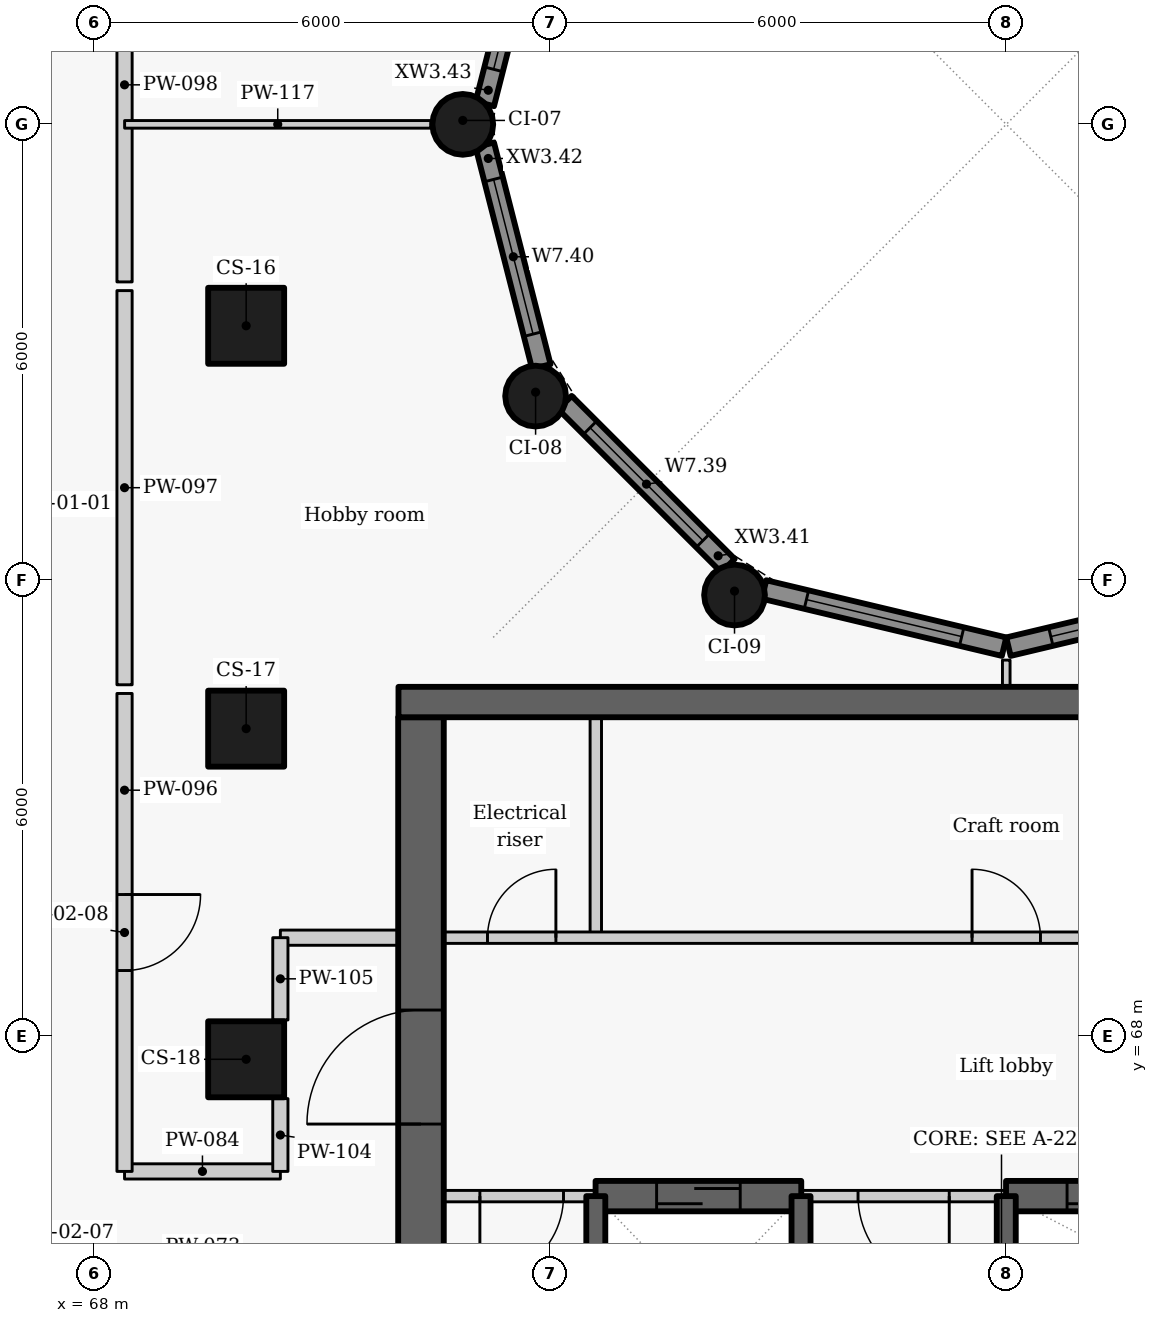
"""IFC4 building model, lengths in metres.
Left out: names, types, materials, properties, quantities, classifications, styles, units other than length and angle.
Written with IfcOpenShell. Run it as: python <this file> out.ifc"""

import sys

from ifc_helpers import new_model, si_unit, direction, frame, frame_2d, origin, origin_2d, place, context, subcontext, project, spatial, rectangle, circle, extrude, element, fill, save


model = new_model("IFC4")
c1 = context("Model", 3, precision=1e-05, world=origin(), true_north=direction((0.0, 1.0)))
c2 = subcontext(c1, "Body", "Model", "MODEL_VIEW")
j1 = project(units=[si_unit("LENGTHUNIT", "METRE"), si_unit("PLANEANGLEUNIT", "RADIAN")], contexts=[c1])
p1 = place(None, origin())
s1 = spatial("IfcSite", under=j1, at=p1, CompositionType="ELEMENT")
p2 = place(p1, origin())
s2 = spatial("IfcBuilding", under=s1, at=p2, CompositionType="ELEMENT")
p3 = place(p2, frame((0.0, 0.0, 130.5)))
s3 = spatial("IfcBuildingStorey", under=s2, at=p3, CompositionType="ELEMENT", Elevation=130.5)
for number, where, z_axis, x_axis in (
    (1, (70.0, 77.35, 0.0), (0.0, 0.0, 1.0), (0.0, -1.0, 0.0)),
    (2, (70.0, 72.05, 0.0), (0.0, 0.0, 1.0), (0.0, -1.0, 0.0)),
    (3, (70.0, 67.7, 0.0), (0.0, 0.0, 1.0), (0.0, -1.0, 0.0)),
):
    element("IfcColumn", number, at=place(p3, frame(where, z_axis=z_axis, x_axis=x_axis)), inside=s3, PredefinedType="COLUMN", context=c2, shape_type="SweptSolid", body=[
        extrude(rectangle(XDim=1.0, YDim=1.0, at=origin_2d()), origin(), (0.0, 0.0, 1.0), 3.3),
    ])
for number, where, z_axis, x_axis in (
    (4, (72.85, 80.0, 0.0), (0.0, 0.0, 1.0), (0.0, -1.0, 0.0)),
    (5, (73.808, 76.425, 0.0), (0.0, 0.0, 1.0), (0.5, -0.866, 0.0)),
    (6, (76.425, 73.808, 0.0), (0.0, 0.0, 1.0), (0.866, -0.5, 0.0)),
):
    element("IfcColumn", number, at=place(p3, frame(where, z_axis=z_axis, x_axis=x_axis)), inside=s3, PredefinedType="COLUMN", context=c2, shape_type="SweptSolid", body=[
        extrude(circle(Radius=0.4, at=origin_2d()), origin(), (0.0, 0.0, 1.0), 3.3),
    ])
p4 = place(p3, frame((83.186, 73.881, 0.0), z_axis=(0.0, 0.0, 1.0), x_axis=(-0.972773113459, -0.231759508395, 0.0)))
e7 = element("IfcWall", 7, at=p4, inside=s3, PredefinedType="SOLIDWALL", context=c2, shape_type="SweptSolid", body=[
    extrude(rectangle(XDim=3.246, YDim=0.25, at=frame_2d((1.623, 0.0))), origin(), (0.0, 0.0, 1.0), 2.425),
])
p5 = place(p4, frame((0.573, 0.0, 0.9)))
e8 = element("IfcOpeningElement", 8, at=p5, cuts=e7, PredefinedType="OPENING", context=c2, shape_type="SweptSolid", body=[
    extrude(rectangle(XDim=2.1, YDim=1.1, at=frame_2d((1.05, 0.55))), frame((0.0, 0.135, 0.0), z_axis=(0.0, -1.0, 0.0), x_axis=(1.0, 0.0, 0.0)), (0.0, 0.0, 1.0), 0.27),
])
p6 = place(p3, frame((79.971, 73.128, 0.0), z_axis=(0.0, 0.0, 1.0), x_axis=(-0.972773113459, 0.231759508395, 0.0)))
e9 = element("IfcWall", 9, at=p6, inside=s3, PredefinedType="SOLIDWALL", context=c2, shape_type="SweptSolid", body=[
    extrude(rectangle(XDim=3.246, YDim=0.25, at=frame_2d((1.623, 0.0))), origin(), (0.0, 0.0, 1.0), 2.425),
])
p7 = place(p6, frame((0.573, 0.0, 0.9)))
e10 = element("IfcOpeningElement", 10, at=p7, cuts=e9, PredefinedType="OPENING", context=c2, shape_type="SweptSolid", body=[
    extrude(rectangle(XDim=2.1, YDim=1.1, at=frame_2d((1.05, 0.55))), frame((0.0, 0.135, 0.0), z_axis=(0.0, -1.0, 0.0), x_axis=(1.0, 0.0, 0.0)), (0.0, 0.0, 1.0), 0.27),
])
p8 = place(p3, frame((76.339, 74.194, 0.0), z_axis=(0.0, 0.0, 1.0), x_axis=(-0.707106781187, 0.707106781187, 0.0)))
e11 = element("IfcWall", 11, at=p8, inside=s3, PredefinedType="SOLIDWALL", context=c2, shape_type="SweptSolid", body=[
    extrude(rectangle(XDim=3.033, YDim=0.25, at=frame_2d((1.517, 0.0))), origin(), (0.0, 0.0, 1.0), 2.425),
])
p9 = place(p8, frame((0.467, 0.0, 0.9)))
e12 = element("IfcOpeningElement", 12, at=p9, cuts=e11, PredefinedType="OPENING", context=c2, shape_type="SweptSolid", body=[
    extrude(rectangle(XDim=2.1, YDim=1.1, at=frame_2d((1.05, 0.55))), frame((0.0, 0.135, 0.0), z_axis=(0.0, -1.0, 0.0), x_axis=(1.0, 0.0, 0.0)), (0.0, 0.0, 1.0), 0.27),
])
p10 = place(p3, frame((73.883, 76.813, 0.0), z_axis=(0.0, 0.0, 1.0), x_axis=(-0.247055971283, 0.969001211069, 0.0)))
e13 = element("IfcWall", 13, at=p10, inside=s3, PredefinedType="SOLIDWALL", context=c2, shape_type="SweptSolid", body=[
    extrude(rectangle(XDim=3.01, YDim=0.25, at=frame_2d((1.505, 0.0))), origin(), (0.0, 0.0, 1.0), 2.425),
])
p11 = place(p10, frame((0.441, 0.0, 0.9)))
e14 = element("IfcOpeningElement", 14, at=p11, cuts=e13, PredefinedType="OPENING", context=c2, shape_type="SweptSolid", body=[
    extrude(rectangle(XDim=2.1, YDim=1.1, at=frame_2d((1.05, 0.55))), frame((0.0, 0.135, 0.0), z_axis=(0.0, -1.0, 0.0), x_axis=(1.0, 0.0, 0.0)), (0.0, 0.0, 1.0), 0.27),
])
p12 = place(p3, frame((73.14, 80.27, 0.0), z_axis=(0.0, 0.0, 1.0), x_axis=(0.247055971283, 0.969001211069, 0.0)))
e15 = element("IfcWall", 15, at=p12, inside=s3, PredefinedType="SOLIDWALL", context=c2, shape_type="SweptSolid", body=[
    extrude(rectangle(XDim=3.01, YDim=0.25, at=frame_2d((1.505, 0.0))), origin(), (0.0, 0.0, 1.0), 2.425),
])
p13 = place(p12, frame((0.469, 0.0, 0.9)))
e16 = element("IfcOpeningElement", 16, at=p13, cuts=e15, PredefinedType="OPENING", context=c2, shape_type="SweptSolid", body=[
    extrude(rectangle(XDim=2.1, YDim=1.1, at=frame_2d((1.05, 0.55))), frame((0.0, 0.135, 0.0), z_axis=(0.0, -1.0, 0.0), x_axis=(1.0, 0.0, 0.0)), (0.0, 0.0, 1.0), 0.27),
])
p14 = place(p3, frame((74.6, 69.3, 0.0), z_axis=(0.0, 0.0, 1.0), x_axis=(0.0, 1.0, 0.0)))
e17 = element("IfcWall", 17, at=p14, inside=s3, PredefinedType="PARTITIONING", context=c2, shape_type="SweptSolid", body=[
    extrude(rectangle(XDim=2.9, YDim=0.15, at=frame_2d((1.45, 0.0))), origin(), (0.0, 0.0, 1.0), 3.025),
])
p15 = place(p3, frame((72.0, 69.3, 0.0), z_axis=(0.0, 0.0, 1.0), x_axis=(1.0, 0.0, 0.0)))
e18 = element("IfcWall", 18, at=p15, inside=s3, PredefinedType="PARTITIONING", context=c2, shape_type="SweptSolid", body=[
    extrude(rectangle(XDim=13.4, YDim=0.15, at=frame_2d((6.7, 0.0))), origin(), (0.0, 0.0, 1.0), 3.025),
])
p16 = place(p15, frame((1.175, 0.0, 0.0)))
e19 = element("IfcOpeningElement", 19, at=p16, cuts=e18, PredefinedType="OPENING", context=c2, shape_type="SweptSolid", body=[
    extrude(rectangle(XDim=0.9, YDim=2.1, at=frame_2d((0.45, 1.05))), frame((0.0, 0.085, 0.0), z_axis=(0.0, -1.0, 0.0), x_axis=(1.0, 0.0, 0.0)), (0.0, 0.0, 1.0), 0.17),
])
p17 = place(p15, frame((7.55, 0.0, 0.0)))
e20 = element("IfcOpeningElement", 20, at=p17, cuts=e18, PredefinedType="OPENING", context=c2, shape_type="SweptSolid", body=[
    extrude(rectangle(XDim=0.9, YDim=2.1, at=frame_2d((0.45, 1.05))), frame((0.0, 0.085, 0.0), z_axis=(0.0, -1.0, 0.0), x_axis=(1.0, 0.0, 0.0)), (0.0, 0.0, 1.0), 0.17),
])
p18 = place(p3, frame((72.3, 63.1, -0.275), z_axis=(0.0, 0.0, 1.0), x_axis=(0.0, 1.0, 0.0)))
e21 = element("IfcWall", 21, at=p18, inside=s3, PredefinedType="SHEAR", context=c2, shape_type="SweptSolid", body=[
    extrude(rectangle(XDim=9.1, YDim=0.6, at=frame_2d((4.55, 0.0))), origin(), (0.0, 0.0, 1.0), 3.3),
])
p19 = place(p18, frame((3.748, 0.0, 0.275)))
e22 = element("IfcOpeningElement", 22, at=p19, cuts=e21, PredefinedType="OPENING", context=c2, shape_type="SweptSolid", body=[
    extrude(rectangle(XDim=1.5, YDim=2.1, at=frame_2d((0.75, 1.05))), frame((0.0, 0.31, 0.0), z_axis=(0.0, -1.0, 0.0), x_axis=(1.0, 0.0, 0.0)), (0.0, 0.0, 1.0), 0.62),
])
p20 = place(p3, frame((74.603, 65.9, 0.0), z_axis=(0.0, 0.0, 1.0), x_axis=(-1.0, 0.0, 0.0)))
e23 = element("IfcWall", 23, at=p20, inside=s3, PredefinedType="PARTITIONING", context=c2, shape_type="SweptSolid", body=[
    extrude(rectangle(XDim=2.603, YDim=0.15, at=frame_2d((1.302, 0.0))), origin(), (0.0, 0.0, 1.0), 3.025),
])
p21 = place(p20, frame((0.428, 0.0, 0.0)))
e24 = element("IfcOpeningElement", 24, at=p21, cuts=e23, PredefinedType="OPENING", context=c2, shape_type="SweptSolid", body=[
    extrude(rectangle(XDim=1.1, YDim=2.1, at=frame_2d((0.55, 1.05))), frame((0.0, 0.085, 0.0), z_axis=(0.0, -1.0, 0.0), x_axis=(1.0, 0.0, 0.0)), (0.0, 0.0, 1.0), 0.17),
])
p22 = place(p3, frame((80.003, 65.9, 0.0), z_axis=(0.0, 0.0, 1.0), x_axis=(-1.0, 0.0, 0.0)))
e25 = element("IfcWall", 25, at=p22, inside=s3, PredefinedType="PARTITIONING", context=c2, shape_type="SweptSolid", body=[
    extrude(rectangle(XDim=2.706, YDim=0.15, at=frame_2d((1.353, 0.0))), origin(), (0.0, 0.0, 1.0), 3.025),
])
p23 = place(p22, frame((0.753, 0.0, 0.0)))
e26 = element("IfcOpeningElement", 26, at=p23, cuts=e25, PredefinedType="OPENING", context=c2, shape_type="SweptSolid", body=[
    extrude(rectangle(XDim=1.2, YDim=2.1, at=frame_2d((0.6, 1.05))), frame((0.0, 0.085, 0.0), z_axis=(0.0, -1.0, 0.0), x_axis=(1.0, 0.0, 0.0)), (0.0, 0.0, 1.0), 0.17),
])
p24 = place(p3, frame((74.597, 65.9, -0.275), z_axis=(0.0, 0.0, 1.0), x_axis=(1.0, 0.0, 0.0)))
e27 = element("IfcWall", 27, at=p24, inside=s3, PredefinedType="SHEAR", context=c2, shape_type="SweptSolid", body=[
    extrude(rectangle(XDim=2.706, YDim=0.4, at=frame_2d((1.353, 0.0))), origin(), (0.0, 0.0, 1.0), 3.3),
])
p25 = place(p24, frame((0.803, 0.0, 0.275)))
e28 = element("IfcOpeningElement", 28, at=p25, cuts=e27, PredefinedType="OPENING", context=c2, shape_type="SweptSolid", body=[
    extrude(rectangle(XDim=1.1, YDim=2.1, at=frame_2d((0.55, 1.05))), frame((0.0, 0.21, 0.0), z_axis=(0.0, -1.0, 0.0), x_axis=(1.0, 0.0, 0.0)), (0.0, 0.0, 1.0), 0.42),
])
p26 = place(p3, frame((79.997, 65.9, -0.275), z_axis=(0.0, 0.0, 1.0), x_axis=(1.0, 0.0, 0.0)))
e29 = element("IfcWall", 29, at=p26, inside=s3, PredefinedType="SHEAR", context=c2, shape_type="SweptSolid", body=[
    extrude(rectangle(XDim=5.406, YDim=0.4, at=frame_2d((2.703, 0.0))), origin(), (0.0, 0.0, 1.0), 3.3),
])
p27 = place(p26, frame((0.803, 0.0, 0.275)))
e30 = element("IfcOpeningElement", 30, at=p27, cuts=e29, PredefinedType="OPENING", context=c2, shape_type="SweptSolid", body=[
    extrude(rectangle(XDim=1.1, YDim=2.1, at=frame_2d((0.55, 1.05))), frame((0.0, 0.21, 0.0), z_axis=(0.0, -1.0, 0.0), x_axis=(1.0, 0.0, 0.0)), (0.0, 0.0, 1.0), 0.42),
])
for number, where, z_axis, x_axis in (
    (31, (74.6, 63.1, -0.275), (0.0, 0.0, 1.0), (0.0, 1.0, 0.0)),
    (32, (77.3, 63.1, -0.275), (0.0, 0.0, 1.0), (0.0, 1.0, 0.0)),
    (33, (80.0, 63.1, -0.275), (0.0, 0.0, 1.0), (0.0, 1.0, 0.0)),
):
    element("IfcWall", number, at=place(p3, frame(where, z_axis=z_axis, x_axis=x_axis)), inside=s3, PredefinedType="SHEAR", context=c2, shape_type="SweptSolid", body=[
        extrude(rectangle(XDim=2.8, YDim=0.25, at=frame_2d((1.4, 0.0))), origin(), (0.0, 0.0, 1.0), 3.3),
    ])
p28 = place(p3, frame((70.45, 69.3, 0.0), z_axis=(0.0, 0.0, 1.0), x_axis=(1.0, 0.0, 0.0)))
e34 = element("IfcWall", 34, at=p28, inside=s3, PredefinedType="PARTITIONING", context=c2, shape_type="SweptSolid", body=[
    extrude(rectangle(XDim=1.55, YDim=0.2, at=frame_2d((0.775, 0.0))), origin(), (0.0, 0.0, 1.0), 3.025),
])
p29 = place(p3, frame((68.4, 66.225, 0.0), z_axis=(0.0, 0.0, 1.0), x_axis=(1.0, 0.0, 0.0)))
e35 = element("IfcWall", 35, at=p29, inside=s3, PredefinedType="PARTITIONING", context=c2, shape_type="SweptSolid", body=[
    extrude(rectangle(XDim=2.05, YDim=0.2, at=frame_2d((1.025, 0.0))), origin(), (0.0, 0.0, 1.0), 2.505),
])
p30 = place(p3, frame((68.4, 72.513, 0.0), z_axis=(0.0, 0.0, 1.0), x_axis=(0.0, -1.0, 0.0)))
e36 = element("IfcWall", 36, at=p30, inside=s3, PredefinedType="PARTITIONING", context=c2, shape_type="SweptSolid", body=[
    extrude(rectangle(XDim=6.288, YDim=0.2, at=frame_2d((3.144, 0.0))), origin(), (0.0, 0.0, 1.0), 3.025),
])
p31 = place(p30, frame((2.645, 0.0, 0.0)))
e37 = element("IfcOpeningElement", 37, at=p31, cuts=e36, PredefinedType="OPENING", context=c2, shape_type="SweptSolid", body=[
    extrude(rectangle(XDim=1.0, YDim=2.1, at=frame_2d((0.5, 1.05))), frame((0.0, 0.11, 0.0), z_axis=(0.0, -1.0, 0.0), x_axis=(1.0, 0.0, 0.0)), (0.0, 0.0, 1.0), 0.22),
])
for number, where, z_axis, x_axis in (
    (38, (68.4, 72.627, 0.0), (0.0, 0.0, 1.0), (0.0, 1.0, 0.0)),
    (39, (68.4, 77.927, 0.0), (0.0, 0.0, 1.0), (0.0, 1.0, 0.0)),
):
    element("IfcWall", number, at=place(p3, frame(where, z_axis=z_axis, x_axis=x_axis)), inside=s3, PredefinedType="PARTITIONING", context=c2, shape_type="SweptSolid", body=[
        extrude(rectangle(XDim=5.186, YDim=0.2, at=frame_2d((2.593, 0.0))), origin(), (0.0, 0.0, 1.0), 3.025),
    ])
p32 = place(p3, frame((70.45, 66.225, 0.0), z_axis=(0.0, 0.0, 1.0), x_axis=(0.0, 1.0, 0.0)))
e40 = element("IfcWall", 40, at=p32, inside=s3, PredefinedType="PARTITIONING", context=c2, shape_type="SweptSolid", body=[
    extrude(rectangle(XDim=0.958, YDim=0.2, at=frame_2d((0.479, 0.0))), origin(), (0.0, 0.0, 1.0), 3.025),
])
p33 = place(p3, frame((70.45, 68.217, 0.0), z_axis=(0.0, 0.0, 1.0), x_axis=(0.0, 1.0, 0.0)))
e41 = element("IfcWall", 41, at=p33, inside=s3, PredefinedType="PARTITIONING", context=c2, shape_type="SweptSolid", body=[
    extrude(rectangle(XDim=1.083, YDim=0.2, at=frame_2d((0.542, 0.0))), origin(), (0.0, 0.0, 1.0), 3.025),
])
p34 = place(p3, frame((80.0, 72.6, 0.0), z_axis=(0.0, 0.0, 1.0), x_axis=(0.0, 1.0, 0.0)))
e42 = element("IfcWall", 42, at=p34, inside=s3, PredefinedType="PARTITIONING", context=c2, shape_type="SweptSolid", body=[
    extrude(rectangle(XDim=0.352, YDim=0.1, at=frame_2d((0.176, 0.0))), origin(), (0.0, 0.0, 1.0), 3.025),
])
p35 = place(p3, frame((68.401, 80.0, 0.0), z_axis=(0.0, 0.0, 1.0), x_axis=(1.0, 0.0, 0.0)))
e43 = element("IfcWall", 43, at=p35, inside=s3, PredefinedType="PARTITIONING", context=c2, shape_type="SweptSolid", body=[
    extrude(rectangle(XDim=4.029, YDim=0.1, at=frame_2d((2.015, 0.0))), origin(), (0.0, 0.0, 1.0), 2.505),
])
p36 = place(p3, frame((72.004, 72.4, -0.275), z_axis=(0.0, 0.0, 1.0), x_axis=(1.0, 0.0, 0.0)))
e44 = element("IfcWall", 44, at=p36, inside=s3, PredefinedType="SHEAR", context=c2, shape_type="SweptSolid", body=[
    extrude(rectangle(XDim=15.992, YDim=0.4, at=frame_2d((7.996, 0.0))), origin(), (0.0, 0.0, 1.0), 3.3),
])
p37 = place(p5, origin())
e45 = element("IfcWindow", 45, at=p37, inside=s3, PartitioningType="SINGLE_PANEL", PredefinedType="WINDOW", context=c2, shape_type="SweptSolid", body=[
    extrude(rectangle(XDim=2.1, YDim=1.1, at=frame_2d((1.05, 0.55))), frame((0.0, 0.03, 0.0), z_axis=(0.0, -1.0, 0.0), x_axis=(1.0, 0.0, 0.0)), (0.0, 0.0, 1.0), 0.06),
])
fill(e8, e45)
p38 = place(p7, origin())
e46 = element("IfcWindow", 46, at=p38, inside=s3, PartitioningType="SINGLE_PANEL", PredefinedType="WINDOW", context=c2, shape_type="SweptSolid", body=[
    extrude(rectangle(XDim=2.1, YDim=1.1, at=frame_2d((1.05, 0.55))), frame((0.0, 0.03, 0.0), z_axis=(0.0, -1.0, 0.0), x_axis=(1.0, 0.0, 0.0)), (0.0, 0.0, 1.0), 0.06),
])
fill(e10, e46)
p39 = place(p9, origin())
e47 = element("IfcWindow", 47, at=p39, inside=s3, PartitioningType="SINGLE_PANEL", PredefinedType="WINDOW", context=c2, shape_type="SweptSolid", body=[
    extrude(rectangle(XDim=2.1, YDim=1.1, at=frame_2d((1.05, 0.55))), frame((0.0, 0.03, 0.0), z_axis=(0.0, -1.0, 0.0), x_axis=(1.0, 0.0, 0.0)), (0.0, 0.0, 1.0), 0.06),
])
fill(e12, e47)
p40 = place(p11, origin())
e48 = element("IfcWindow", 48, at=p40, inside=s3, PartitioningType="SINGLE_PANEL", PredefinedType="WINDOW", context=c2, shape_type="SweptSolid", body=[
    extrude(rectangle(XDim=2.1, YDim=1.1, at=frame_2d((1.05, 0.55))), frame((0.0, 0.03, 0.0), z_axis=(0.0, -1.0, 0.0), x_axis=(1.0, 0.0, 0.0)), (0.0, 0.0, 1.0), 0.06),
])
fill(e14, e48)
p41 = place(p13, origin())
e49 = element("IfcWindow", 49, at=p41, inside=s3, PartitioningType="SINGLE_PANEL", PredefinedType="WINDOW", context=c2, shape_type="SweptSolid", body=[
    extrude(rectangle(XDim=2.1, YDim=1.1, at=frame_2d((1.05, 0.55))), frame((0.0, 0.03, 0.0), z_axis=(0.0, -1.0, 0.0), x_axis=(1.0, 0.0, 0.0)), (0.0, 0.0, 1.0), 0.06),
])
fill(e16, e49)
p42 = place(p16, origin())
e50 = element("IfcDoor", 50, at=p42, inside=s3, OperationType="SINGLE_SWING_RIGHT", PredefinedType="DOOR", context=c2, shape_type="SweptSolid", body=[
    extrude(rectangle(XDim=0.9, YDim=2.1, at=frame_2d((0.45, 1.05))), frame((0.0, 0.025, 0.0), z_axis=(0.0, -1.0, 0.0), x_axis=(1.0, 0.0, 0.0)), (0.0, 0.0, 1.0), 0.05),
])
fill(e19, e50)
p43 = place(p17, origin())
e51 = element("IfcDoor", 51, at=p43, inside=s3, OperationType="SINGLE_SWING_LEFT", PredefinedType="DOOR", context=c2, shape_type="SweptSolid", body=[
    extrude(rectangle(XDim=0.9, YDim=2.1, at=frame_2d((0.45, 1.05))), frame((0.0, 0.025, 0.0), z_axis=(0.0, -1.0, 0.0), x_axis=(1.0, 0.0, 0.0)), (0.0, 0.0, 1.0), 0.05),
])
fill(e20, e51)
p44 = place(p21, origin())
e52 = element("IfcDoor", 52, at=p44, inside=s3, OperationType="SINGLE_SWING_RIGHT", PredefinedType="DOOR", context=c2, shape_type="SweptSolid", body=[
    extrude(rectangle(XDim=1.1, YDim=2.1, at=frame_2d((0.55, 1.05))), frame((0.0, 0.025, 0.0), z_axis=(0.0, -1.0, 0.0), x_axis=(1.0, 0.0, 0.0)), (0.0, 0.0, 1.0), 0.05),
])
fill(e24, e52)
p45 = place(p25, origin())
e53 = element("IfcDoor", 53, at=p45, inside=s3, OperationType="SLIDING_TO_LEFT", PredefinedType="DOOR", context=c2, shape_type="SweptSolid", body=[
    extrude(rectangle(XDim=1.1, YDim=2.1, at=frame_2d((0.55, 1.05))), frame((0.0, 0.025, 0.0), z_axis=(0.0, -1.0, 0.0), x_axis=(1.0, 0.0, 0.0)), (0.0, 0.0, 1.0), 0.05),
])
fill(e28, e53)
p46 = place(p23, origin())
e54 = element("IfcDoor", 54, at=p46, inside=s3, OperationType="DOUBLE_DOOR_SINGLE_SWING", PredefinedType="DOOR", context=c2, shape_type="SweptSolid", body=[
    extrude(rectangle(XDim=1.2, YDim=2.1, at=frame_2d((0.6, 1.05))), frame((0.0, 0.025, 0.0), z_axis=(0.0, -1.0, 0.0), x_axis=(1.0, 0.0, 0.0)), (0.0, 0.0, 1.0), 0.05),
])
fill(e26, e54)
p47 = place(p27, origin())
e55 = element("IfcDoor", 55, at=p47, inside=s3, OperationType="SLIDING_TO_LEFT", PredefinedType="DOOR", context=c2, shape_type="SweptSolid", body=[
    extrude(rectangle(XDim=1.1, YDim=2.1, at=frame_2d((0.55, 1.05))), frame((0.0, 0.025, 0.0), z_axis=(0.0, -1.0, 0.0), x_axis=(1.0, 0.0, 0.0)), (0.0, 0.0, 1.0), 0.05),
])
fill(e30, e55)
p48 = place(p31, origin())
e56 = element("IfcDoor", 56, at=p48, inside=s3, OperationType="SINGLE_SWING_LEFT", PredefinedType="DOOR", context=c2, shape_type="SweptSolid", body=[
    extrude(rectangle(XDim=1.0, YDim=2.1, at=frame_2d((0.5, 1.05))), frame((0.0, 0.025, 0.0), z_axis=(0.0, -1.0, 0.0), x_axis=(1.0, 0.0, 0.0)), (0.0, 0.0, 1.0), 0.05),
])
fill(e37, e56)
p49 = place(p19, origin())
e57 = element("IfcDoor", 57, at=p49, inside=s3, OperationType="DOUBLE_DOOR_SINGLE_SWING", PredefinedType="DOOR", context=c2, shape_type="SweptSolid", body=[
    extrude(rectangle(XDim=1.5, YDim=2.1, at=frame_2d((0.75, 1.05))), frame((0.0, 0.025, 0.0), z_axis=(0.0, -1.0, 0.0), x_axis=(1.0, 0.0, 0.0)), (0.0, 0.0, 1.0), 0.05),
])
fill(e22, e57)
save(model, sys.argv[1])
